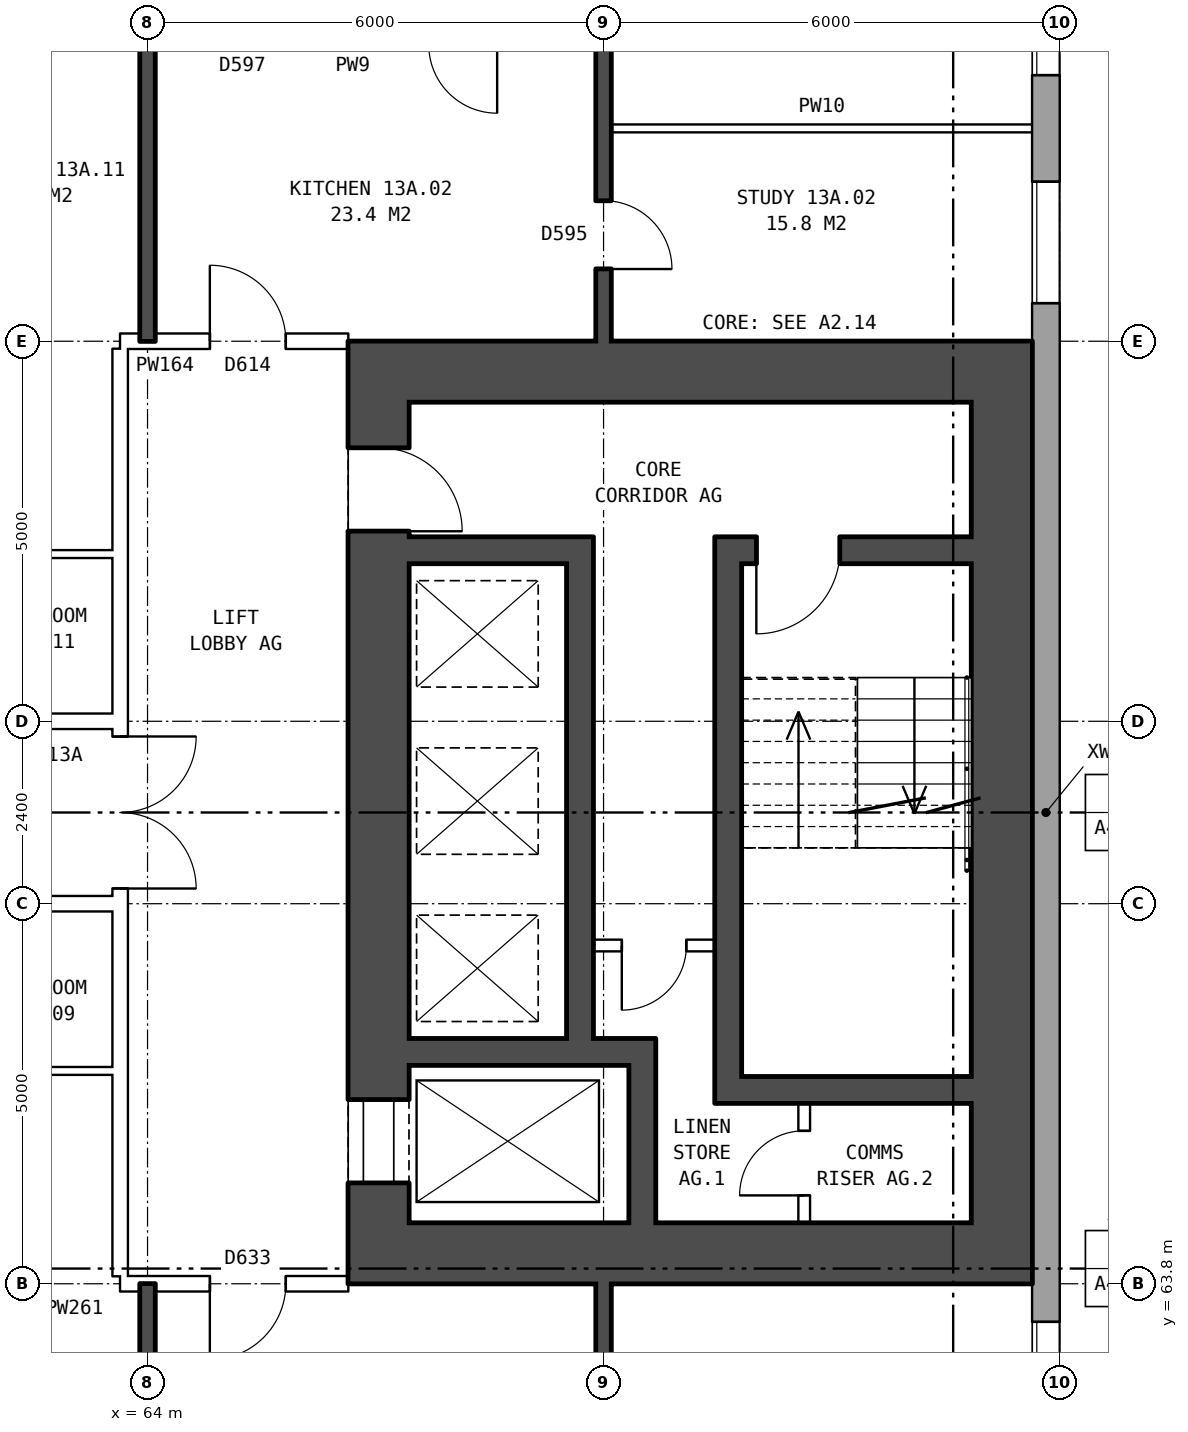
"""IFC4 building model, lengths in metres.
Left out: names, types, materials, properties, quantities, classifications, styles, units other than length and angle.
Written with IfcOpenShell. Run it as: python <this file> out.ifc"""

import sys

from ifc_helpers import new_model, si_unit, direction, frame, frame_2d, origin, place, context, subcontext, project, spatial, rectangle, extrude, element, fill, save


model = new_model("IFC4")
c1 = context("Model", 3, precision=1e-05, world=origin(), true_north=direction((0.0, 1.0)))
c2 = subcontext(c1, "Body", "Model", "MODEL_VIEW")
j1 = project(units=[si_unit("LENGTHUNIT", "METRE"), si_unit("PLANEANGLEUNIT", "RADIAN")], contexts=[c1])
p1 = place(None, origin())
s1 = spatial("IfcSite", under=j1, at=p1, CompositionType="ELEMENT")
p2 = place(p1, origin())
s2 = spatial("IfcBuilding", under=s1, at=p2, CompositionType="ELEMENT")
p3 = place(p2, frame((0.0, 0.0, 50.5)))
s3 = spatial("IfcBuildingStorey", under=s2, at=p3, CompositionType="ELEMENT", Elevation=50.5)
p4 = place(p3, frame((75.82, 57.075, 0.0), z_axis=(0.0, 0.0, 1.0), x_axis=(0.0, 1.0, 0.0)))
e1 = element("IfcWall", 1, at=p4, inside=s3, PredefinedType="STANDARD", context=c2, shape_type="SweptSolid", body=[
    extrude(rectangle(XDim=25.851, YDim=0.36, at=frame_2d((12.925, 0.0))), origin(), (0.0, 0.0, 1.0), 2.85),
])
p5 = place(p4, frame((1.625, 0.0, 0.8)))
e2 = element("IfcOpeningElement", 2, at=p5, cuts=e1, PredefinedType="OPENING", context=c2, shape_type="SweptSolid", body=[
    extrude(rectangle(XDim=1.6, YDim=1.8, at=frame_2d((0.8, 0.9))), frame((0.0, 0.19, 0.0), z_axis=(0.0, -1.0, 0.0), x_axis=(1.0, 0.0, 0.0)), (0.0, 0.0, 1.0), 0.38),
])
p6 = place(p4, frame((4.625, 0.0, 0.8)))
e3 = element("IfcOpeningElement", 3, at=p6, cuts=e1, PredefinedType="OPENING", context=c2, shape_type="SweptSolid", body=[
    extrude(rectangle(XDim=1.6, YDim=1.8, at=frame_2d((0.8, 0.9))), frame((0.0, 0.19, 0.0), z_axis=(0.0, -1.0, 0.0), x_axis=(1.0, 0.0, 0.0)), (0.0, 0.0, 1.0), 0.38),
])
p7 = place(p4, frame((19.625, 0.0, 0.8)))
e4 = element("IfcOpeningElement", 4, at=p7, cuts=e1, PredefinedType="OPENING", context=c2, shape_type="SweptSolid", body=[
    extrude(rectangle(XDim=1.6, YDim=1.8, at=frame_2d((0.8, 0.9))), frame((0.0, 0.19, 0.0), z_axis=(0.0, -1.0, 0.0), x_axis=(1.0, 0.0, 0.0)), (0.0, 0.0, 1.0), 0.38),
])
p8 = place(p4, frame((22.625, 0.0, 0.8)))
e5 = element("IfcOpeningElement", 5, at=p8, cuts=e1, PredefinedType="OPENING", context=c2, shape_type="SweptSolid", body=[
    extrude(rectangle(XDim=1.6, YDim=1.8, at=frame_2d((0.8, 0.9))), frame((0.0, 0.19, 0.0), z_axis=(0.0, -1.0, 0.0), x_axis=(1.0, 0.0, 0.0)), (0.0, 0.0, 1.0), 0.38),
])
p9 = place(p3, frame((67.04, 64.6, 0.0), z_axis=(0.0, 0.0, 1.0), x_axis=(0.0, 1.0, 0.0)))
e6 = element("IfcWall", 6, at=p9, inside=s3, PredefinedType="SHEAR", context=c2, shape_type="SweptSolid", body=[
    extrude(rectangle(XDim=10.8, YDim=0.8, at=frame_2d((5.4, 0.0))), origin(), (0.0, 0.0, 1.0), 2.85),
])
p10 = place(p9, frame((0.525, 0.0, 0.0)))
e7 = element("IfcOpeningElement", 7, at=p10, cuts=e6, PredefinedType="OPENING", context=c2, shape_type="SweptSolid", body=[
    extrude(rectangle(XDim=1.1, YDim=2.1, at=frame_2d((0.55, 1.05))), frame((0.0, 0.41, 0.0), z_axis=(0.0, -1.0, 0.0), x_axis=(1.0, 0.0, 0.0)), (0.0, 0.0, 1.0), 0.82),
])
p11 = place(p9, frame((9.1, 0.0, 0.0)))
e8 = element("IfcOpeningElement", 8, at=p11, cuts=e6, PredefinedType="OPENING", context=c2, shape_type="SweptSolid", body=[
    extrude(rectangle(XDim=1.1, YDim=2.1, at=frame_2d((0.55, 1.05))), frame((0.0, 0.41, 0.0), z_axis=(0.0, -1.0, 0.0), x_axis=(1.0, 0.0, 0.0)), (0.0, 0.0, 1.0), 0.82),
])
p12 = place(p3, frame((75.24, 64.6, 0.0), z_axis=(0.0, 0.0, 1.0), x_axis=(0.0, 1.0, 0.0)))
e9 = element("IfcWall", 9, at=p12, inside=s3, PredefinedType="SHEAR", context=c2, shape_type="SweptSolid", body=[
    extrude(rectangle(XDim=10.8, YDim=0.8, at=frame_2d((5.4, 0.0))), origin(), (0.0, 0.0, 1.0), 2.85),
])
for number, where, z_axis, x_axis in (
    (10, (66.64, 64.2, 0.0), (0.0, 0.0, 1.0), (1.0, 0.0, 0.0)),
    (11, (66.64, 75.8, 0.0), (0.0, 0.0, 1.0), (1.0, 0.0, 0.0)),
):
    element("IfcWall", number, at=place(p3, frame(where, z_axis=z_axis, x_axis=x_axis)), inside=s3, PredefinedType="SHEAR", context=c2, shape_type="SweptSolid", body=[
        extrude(rectangle(XDim=9.0, YDim=0.8, at=frame_2d((4.5, 0.0))), origin(), (0.0, 0.0, 1.0), 2.85),
    ])
p13 = place(p3, frame((71.815, 66.35, 0.0), z_axis=(0.0, 0.0, 1.0), x_axis=(1.0, 0.0, 0.0)))
e12 = element("IfcWall", 12, at=p13, inside=s3, PredefinedType="SHEAR", context=c2, shape_type="SweptSolid", body=[
    extrude(rectangle(XDim=3.025, YDim=0.35, at=frame_2d((1.513, 0.0))), origin(), (0.0, 0.0, 1.0), 2.85),
])
p14 = place(p3, frame((67.44, 66.85, 0.0), z_axis=(0.0, 0.0, 1.0), x_axis=(1.0, 0.0, 0.0)))
e13 = element("IfcWall", 13, at=p14, inside=s3, PredefinedType="SHEAR", context=c2, shape_type="SweptSolid", body=[
    extrude(rectangle(XDim=3.245, YDim=0.35, at=frame_2d((1.623, 0.0))), origin(), (0.0, 0.0, 1.0), 2.85),
])
p15 = place(p3, frame((69.865, 68.25, 0.0), z_axis=(0.0, 0.0, 1.0), x_axis=(1.0, 0.0, 0.0)))
e14 = element("IfcWall", 14, at=p15, inside=s3, PredefinedType="PARTITIONING", context=c2, shape_type="SweptSolid", body=[
    extrude(rectangle(XDim=1.6, YDim=0.15, at=frame_2d((0.8, 0.0))), origin(), (0.0, 0.0, 1.0), 2.85),
])
p16 = place(p15, frame((0.375, 0.0, 0.0)))
e15 = element("IfcOpeningElement", 15, at=p16, cuts=e14, PredefinedType="OPENING", context=c2, shape_type="SweptSolid", body=[
    extrude(rectangle(XDim=0.85, YDim=2.1, at=frame_2d((0.425, 1.05))), frame((0.0, 0.085, 0.0), z_axis=(0.0, -1.0, 0.0), x_axis=(1.0, 0.0, 0.0)), (0.0, 0.0, 1.0), 0.17),
])
p17 = place(p3, frame((67.44, 73.45, 0.0), z_axis=(0.0, 0.0, 1.0), x_axis=(1.0, 0.0, 0.0)))
e16 = element("IfcWall", 16, at=p17, inside=s3, PredefinedType="SHEAR", context=c2, shape_type="SweptSolid", body=[
    extrude(rectangle(XDim=2.075, YDim=0.35, at=frame_2d((1.038, 0.0))), origin(), (0.0, 0.0, 1.0), 2.85),
])
p18 = place(p3, frame((71.815, 73.45, 0.0), z_axis=(0.0, 0.0, 1.0), x_axis=(1.0, 0.0, 0.0)))
e17 = element("IfcWall", 17, at=p18, inside=s3, PredefinedType="SHEAR", context=c2, shape_type="SweptSolid", body=[
    extrude(rectangle(XDim=3.025, YDim=0.35, at=frame_2d((1.513, 0.0))), origin(), (0.0, 0.0, 1.0), 2.85),
])
p19 = place(p18, frame((0.195, 0.0, 0.0)))
e18 = element("IfcOpeningElement", 18, at=p19, cuts=e17, PredefinedType="OPENING", context=c2, shape_type="SweptSolid", body=[
    extrude(rectangle(XDim=1.1, YDim=2.1, at=frame_2d((0.55, 1.05))), frame((0.0, 0.185, 0.0), z_axis=(0.0, -1.0, 0.0), x_axis=(1.0, 0.0, 0.0)), (0.0, 0.0, 1.0), 0.37),
])
p20 = place(p3, frame((69.69, 67.025, 0.0), z_axis=(0.0, 0.0, 1.0), x_axis=(0.0, 1.0, 0.0)))
e19 = element("IfcWall", 19, at=p20, inside=s3, PredefinedType="SHEAR", context=c2, shape_type="SweptSolid", body=[
    extrude(rectangle(XDim=6.6, YDim=0.35, at=frame_2d((3.3, 0.0))), origin(), (0.0, 0.0, 1.0), 2.85),
])
p21 = place(p3, frame((70.51, 64.6, 0.0), z_axis=(0.0, 0.0, 1.0), x_axis=(0.0, 1.0, 0.0)))
e20 = element("IfcWall", 20, at=p21, inside=s3, PredefinedType="SHEAR", context=c2, shape_type="SweptSolid", body=[
    extrude(rectangle(XDim=2.075, YDim=0.35, at=frame_2d((1.038, 0.0))), origin(), (0.0, 0.0, 1.0), 2.85),
])
p22 = place(p3, frame((71.64, 66.175, 0.0), z_axis=(0.0, 0.0, 1.0), x_axis=(0.0, 1.0, 0.0)))
e21 = element("IfcWall", 21, at=p22, inside=s3, PredefinedType="SHEAR", context=c2, shape_type="SweptSolid", body=[
    extrude(rectangle(XDim=7.45, YDim=0.35, at=frame_2d((3.725, 0.0))), origin(), (0.0, 0.0, 1.0), 2.85),
])
p23 = place(p3, frame((72.64, 64.6, 0.0), z_axis=(0.0, 0.0, 1.0), x_axis=(0.0, 1.0, 0.0)))
e22 = element("IfcWall", 22, at=p23, inside=s3, PredefinedType="PARTITIONING", context=c2, shape_type="SweptSolid", body=[
    extrude(rectangle(XDim=1.575, YDim=0.15, at=frame_2d((0.788, 0.0))), origin(), (0.0, 0.0, 1.0), 2.85),
])
p24 = place(p23, frame((0.363, 0.0, 0.0)))
e23 = element("IfcOpeningElement", 23, at=p24, cuts=e22, PredefinedType="OPENING", context=c2, shape_type="SweptSolid", body=[
    extrude(rectangle(XDim=0.85, YDim=2.1, at=frame_2d((0.425, 1.05))), frame((0.0, 0.085, 0.0), z_axis=(0.0, -1.0, 0.0), x_axis=(1.0, 0.0, 0.0)), (0.0, 0.0, 1.0), 0.17),
])
p25 = place(p3, frame((63.64, 63.9, 0.0), z_axis=(0.0, 0.0, 1.0), x_axis=(0.0, 1.0, 0.0)))
e24 = element("IfcWall", 24, at=p25, inside=s3, PredefinedType="PARTITIONING", context=c2, shape_type="SweptSolid", body=[
    extrude(rectangle(XDim=12.2, YDim=0.2, at=frame_2d((6.1, 0.0))), origin(), (0.0, 0.0, 1.0), 2.85),
])
p26 = place(p25, frame((5.1, 0.0, 0.0)))
e25 = element("IfcOpeningElement", 25, at=p26, cuts=e24, PredefinedType="OPENING", context=c2, shape_type="SweptSolid", body=[
    extrude(rectangle(XDim=2.0, YDim=2.1, at=frame_2d((1.0, 1.05))), frame((0.0, 0.11, 0.0), z_axis=(0.0, -1.0, 0.0), x_axis=(1.0, 0.0, 0.0)), (0.0, 0.0, 1.0), 0.22),
])
p27 = place(p3, frame((63.64, 63.8, 0.0), z_axis=(0.0, 0.0, 1.0), x_axis=(1.0, 0.0, 0.0)))
e26 = element("IfcWall", 26, at=p27, inside=s3, PredefinedType="PARTITIONING", context=c2, shape_type="SweptSolid", body=[
    extrude(rectangle(XDim=3.0, YDim=0.2, at=frame_2d((1.5, 0.0))), origin(), (0.0, 0.0, 1.0), 2.85),
])
p28 = place(p27, frame((1.18, 0.0, 0.0)))
e27 = element("IfcOpeningElement", 27, at=p28, cuts=e26, PredefinedType="OPENING", context=c2, shape_type="SweptSolid", body=[
    extrude(rectangle(XDim=1.0, YDim=2.1, at=frame_2d((0.5, 1.05))), frame((0.0, 0.11, 0.0), z_axis=(0.0, -1.0, 0.0), x_axis=(1.0, 0.0, 0.0)), (0.0, 0.0, 1.0), 0.22),
])
p29 = place(p3, frame((61.0, 66.6, 0.0), z_axis=(0.0, 0.0, 1.0), x_axis=(1.0, 0.0, 0.0)))
e28 = element("IfcWall", 28, at=p29, inside=s3, PredefinedType="PARTITIONING", context=c2, shape_type="SweptSolid", body=[
    extrude(rectangle(XDim=2.64, YDim=0.1, at=frame_2d((1.32, 0.0))), origin(), (0.0, 0.0, 1.0), 2.85),
])
p30 = place(p3, frame((44.36, 68.8, 0.0), z_axis=(0.0, 0.0, 1.0), x_axis=(1.0, 0.0, 0.0)))
e29 = element("IfcWall", 29, at=p30, inside=s3, PredefinedType="PARTITIONING", context=c2, shape_type="SweptSolid", body=[
    extrude(rectangle(XDim=19.28, YDim=0.2, at=frame_2d((9.64, 0.0))), origin(), (0.0, 0.0, 1.0), 2.85),
])
p31 = place(p30, frame((14.64, 0.0, 0.0)))
e30 = element("IfcOpeningElement", 30, at=p31, cuts=e29, PredefinedType="OPENING", context=c2, shape_type="SweptSolid", body=[
    extrude(rectangle(XDim=1.0, YDim=2.1, at=frame_2d((0.5, 1.05))), frame((0.0, 0.11, 0.0), z_axis=(0.0, -1.0, 0.0), x_axis=(1.0, 0.0, 0.0)), (0.0, 0.0, 1.0), 0.22),
])
p32 = place(p30, frame((5.64, 0.0, 0.0)))
e31 = element("IfcOpeningElement", 31, at=p32, cuts=e29, PredefinedType="OPENING", context=c2, shape_type="SweptSolid", body=[
    extrude(rectangle(XDim=1.0, YDim=2.1, at=frame_2d((0.5, 1.05))), frame((0.0, 0.11, 0.0), z_axis=(0.0, -1.0, 0.0), x_axis=(1.0, 0.0, 0.0)), (0.0, 0.0, 1.0), 0.22),
])
p33 = place(p3, frame((44.36, 71.2, 0.0), z_axis=(0.0, 0.0, 1.0), x_axis=(1.0, 0.0, 0.0)))
e32 = element("IfcWall", 32, at=p33, inside=s3, PredefinedType="PARTITIONING", context=c2, shape_type="SweptSolid", body=[
    extrude(rectangle(XDim=19.28, YDim=0.2, at=frame_2d((9.64, 0.0))), origin(), (0.0, 0.0, 1.0), 2.85),
])
p34 = place(p33, frame((14.64, 0.0, 0.0)))
e33 = element("IfcOpeningElement", 33, at=p34, cuts=e32, PredefinedType="OPENING", context=c2, shape_type="SweptSolid", body=[
    extrude(rectangle(XDim=1.0, YDim=2.1, at=frame_2d((0.5, 1.05))), frame((0.0, 0.11, 0.0), z_axis=(0.0, -1.0, 0.0), x_axis=(1.0, 0.0, 0.0)), (0.0, 0.0, 1.0), 0.22),
])
p35 = place(p33, frame((5.64, 0.0, 0.0)))
e34 = element("IfcOpeningElement", 34, at=p35, cuts=e32, PredefinedType="OPENING", context=c2, shape_type="SweptSolid", body=[
    extrude(rectangle(XDim=1.0, YDim=2.1, at=frame_2d((0.5, 1.05))), frame((0.0, 0.11, 0.0), z_axis=(0.0, -1.0, 0.0), x_axis=(1.0, 0.0, 0.0)), (0.0, 0.0, 1.0), 0.22),
])
p36 = place(p3, frame((61.0, 73.4, 0.0), z_axis=(0.0, 0.0, 1.0), x_axis=(1.0, 0.0, 0.0)))
e35 = element("IfcWall", 35, at=p36, inside=s3, PredefinedType="PARTITIONING", context=c2, shape_type="SweptSolid", body=[
    extrude(rectangle(XDim=2.64, YDim=0.1, at=frame_2d((1.32, 0.0))), origin(), (0.0, 0.0, 1.0), 2.85),
])
p37 = place(p3, frame((63.64, 76.2, 0.0), z_axis=(0.0, 0.0, 1.0), x_axis=(1.0, 0.0, 0.0)))
e36 = element("IfcWall", 36, at=p37, inside=s3, PredefinedType="PARTITIONING", context=c2, shape_type="SweptSolid", body=[
    extrude(rectangle(XDim=3.0, YDim=0.2, at=frame_2d((1.5, 0.0))), origin(), (0.0, 0.0, 1.0), 2.85),
])
p38 = place(p37, frame((1.18, 0.0, 0.0)))
e37 = element("IfcOpeningElement", 37, at=p38, cuts=e36, PredefinedType="OPENING", context=c2, shape_type="SweptSolid", body=[
    extrude(rectangle(XDim=1.0, YDim=2.1, at=frame_2d((0.5, 1.05))), frame((0.0, 0.11, 0.0), z_axis=(0.0, -1.0, 0.0), x_axis=(1.0, 0.0, 0.0)), (0.0, 0.0, 1.0), 0.22),
])
p39 = place(p3, frame((70.1, 79.0, 0.0), z_axis=(0.0, 0.0, 1.0), x_axis=(1.0, 0.0, 0.0)))
e38 = element("IfcWall", 38, at=p39, inside=s3, PredefinedType="PARTITIONING", context=c2, shape_type="SweptSolid", body=[
    extrude(rectangle(XDim=5.54, YDim=0.1, at=frame_2d((2.77, 0.0))), origin(), (0.0, 0.0, 1.0), 2.85),
])
for number, where, z_axis, x_axis in (
    (39, (64.0, 54.36, 0.0), (0.0, 0.0, 1.0), (0.0, 1.0, 0.0)),
    (40, (64.0, 76.2, 0.0), (0.0, 0.0, 1.0), (0.0, 1.0, 0.0)),
):
    element("IfcWall", number, at=place(p3, frame(where, z_axis=z_axis, x_axis=x_axis)), inside=s3, PredefinedType="SOLIDWALL", context=c2, shape_type="SweptSolid", body=[
        extrude(rectangle(XDim=9.44, YDim=0.2, at=frame_2d((4.72, 0.0))), origin(), (0.0, 0.0, 1.0), 2.85),
    ])
p40 = place(p3, frame((70.0, 54.36, 0.0), z_axis=(0.0, 0.0, 1.0), x_axis=(0.0, 1.0, 0.0)))
e41 = element("IfcWall", 41, at=p40, inside=s3, PredefinedType="SOLIDWALL", context=c2, shape_type="SweptSolid", body=[
    extrude(rectangle(XDim=9.44, YDim=0.2, at=frame_2d((4.72, 0.0))), origin(), (0.0, 0.0, 1.0), 2.85),
])
p41 = place(p40, frame((7.04, 0.0, 0.0)))
e42 = element("IfcOpeningElement", 42, at=p41, cuts=e41, PredefinedType="OPENING", context=c2, shape_type="SweptSolid", body=[
    extrude(rectangle(XDim=0.9, YDim=2.1, at=frame_2d((0.45, 1.05))), frame((0.0, 0.11, 0.0), z_axis=(0.0, -1.0, 0.0), x_axis=(1.0, 0.0, 0.0)), (0.0, 0.0, 1.0), 0.22),
])
p42 = place(p3, frame((70.0, 76.2, 0.0), z_axis=(0.0, 0.0, 1.0), x_axis=(0.0, 1.0, 0.0)))
e43 = element("IfcWall", 43, at=p42, inside=s3, PredefinedType="SOLIDWALL", context=c2, shape_type="SweptSolid", body=[
    extrude(rectangle(XDim=9.44, YDim=0.2, at=frame_2d((4.72, 0.0))), origin(), (0.0, 0.0, 1.0), 2.85),
])
p43 = place(p42, frame((6.22, 0.0, 0.0)))
e44 = element("IfcOpeningElement", 44, at=p43, cuts=e43, PredefinedType="OPENING", context=c2, shape_type="SweptSolid", body=[
    extrude(rectangle(XDim=0.9, YDim=2.1, at=frame_2d((0.45, 1.05))), frame((0.0, 0.11, 0.0), z_axis=(0.0, -1.0, 0.0), x_axis=(1.0, 0.0, 0.0)), (0.0, 0.0, 1.0), 0.22),
])
p44 = place(p42, frame((0.95, 0.0, 0.0)))
e45 = element("IfcOpeningElement", 45, at=p44, cuts=e43, PredefinedType="OPENING", context=c2, shape_type="SweptSolid", body=[
    extrude(rectangle(XDim=0.9, YDim=2.1, at=frame_2d((0.45, 1.05))), frame((0.0, 0.11, 0.0), z_axis=(0.0, -1.0, 0.0), x_axis=(1.0, 0.0, 0.0)), (0.0, 0.0, 1.0), 0.22),
])
p45 = place(p6, origin())
e46 = element("IfcWindow", 46, at=p45, inside=s3, PartitioningType="SINGLE_PANEL", PredefinedType="WINDOW", context=c2, shape_type="SweptSolid", body=[
    extrude(rectangle(XDim=1.6, YDim=1.8, at=frame_2d((0.8, 0.9))), frame((0.0, 0.15, 0.0), z_axis=(0.0, -1.0, 0.0), x_axis=(1.0, 0.0, 0.0)), (0.0, 0.0, 1.0), 0.06),
])
fill(e3, e46)
p46 = place(p7, origin())
e47 = element("IfcWindow", 47, at=p46, inside=s3, PartitioningType="SINGLE_PANEL", PredefinedType="WINDOW", context=c2, shape_type="SweptSolid", body=[
    extrude(rectangle(XDim=1.6, YDim=1.8, at=frame_2d((0.8, 0.9))), frame((0.0, 0.15, 0.0), z_axis=(0.0, -1.0, 0.0), x_axis=(1.0, 0.0, 0.0)), (0.0, 0.0, 1.0), 0.06),
])
fill(e4, e47)
p47 = place(p8, origin())
e48 = element("IfcWindow", 48, at=p47, inside=s3, PartitioningType="SINGLE_PANEL", PredefinedType="WINDOW", context=c2, shape_type="SweptSolid", body=[
    extrude(rectangle(XDim=1.6, YDim=1.8, at=frame_2d((0.8, 0.9))), frame((0.0, 0.15, 0.0), z_axis=(0.0, -1.0, 0.0), x_axis=(1.0, 0.0, 0.0)), (0.0, 0.0, 1.0), 0.06),
])
fill(e5, e48)
p48 = place(p10, origin())
e49 = element("IfcDoor", 49, at=p48, inside=s3, OperationType="DOUBLE_DOOR_SLIDING", PredefinedType="DOOR", context=c2, shape_type="SweptSolid", body=[
    extrude(rectangle(XDim=1.1, YDim=2.1, at=frame_2d((0.55, 1.05))), frame((0.0, -0.335, 0.0), z_axis=(0.0, -1.0, 0.0), x_axis=(1.0, 0.0, 0.0)), (0.0, 0.0, 1.0), 0.05),
])
fill(e7, e49)
p49 = place(p11, frame((1.1, 0.0, 0.0), z_axis=(0.0, 0.0, 1.0), x_axis=(-1.0, 0.0, 0.0)))
e50 = element("IfcDoor", 50, at=p49, inside=s3, OperationType="SINGLE_SWING_RIGHT", PredefinedType="DOOR", context=c2, shape_type="SweptSolid", body=[
    extrude(rectangle(XDim=1.1, YDim=2.1, at=frame_2d((0.55, 1.05))), frame((0.0, 0.385, 0.0), z_axis=(0.0, -1.0, 0.0), x_axis=(1.0, 0.0, 0.0)), (0.0, 0.0, 1.0), 0.05),
])
fill(e8, e50)
p50 = place(p19, frame((1.1, 0.0, 0.0), z_axis=(0.0, 0.0, 1.0), x_axis=(-1.0, 0.0, 0.0)))
e51 = element("IfcDoor", 51, at=p50, inside=s3, OperationType="SINGLE_SWING_RIGHT", PredefinedType="DOOR", context=c2, shape_type="SweptSolid", body=[
    extrude(rectangle(XDim=1.1, YDim=2.1, at=frame_2d((0.55, 1.05))), frame((0.0, 0.025, 0.0), z_axis=(0.0, -1.0, 0.0), x_axis=(1.0, 0.0, 0.0)), (0.0, 0.0, 1.0), 0.05),
])
fill(e18, e51)
p51 = place(p16, frame((0.85, 0.0, 0.0), z_axis=(0.0, 0.0, 1.0), x_axis=(-1.0, 0.0, 0.0)))
e52 = element("IfcDoor", 52, at=p51, inside=s3, OperationType="SINGLE_SWING_RIGHT", PredefinedType="DOOR", context=c2, shape_type="SweptSolid", body=[
    extrude(rectangle(XDim=0.85, YDim=2.1, at=frame_2d((0.425, 1.05))), frame((0.0, 0.025, 0.0), z_axis=(0.0, -1.0, 0.0), x_axis=(1.0, 0.0, 0.0)), (0.0, 0.0, 1.0), 0.05),
])
fill(e15, e52)
p52 = place(p24, origin())
e53 = element("IfcDoor", 53, at=p52, inside=s3, OperationType="SINGLE_SWING_LEFT", PredefinedType="DOOR", context=c2, shape_type="SweptSolid", body=[
    extrude(rectangle(XDim=0.85, YDim=2.1, at=frame_2d((0.425, 1.05))), frame((0.0, 0.025, 0.0), z_axis=(0.0, -1.0, 0.0), x_axis=(1.0, 0.0, 0.0)), (0.0, 0.0, 1.0), 0.05),
])
fill(e23, e53)
p53 = place(p26, frame((2.0, 0.0, 0.0), z_axis=(0.0, 0.0, 1.0), x_axis=(-1.0, 0.0, 0.0)))
e54 = element("IfcDoor", 54, at=p53, inside=s3, OperationType="DOUBLE_DOOR_SINGLE_SWING", PredefinedType="DOOR", context=c2, shape_type="SweptSolid", body=[
    extrude(rectangle(XDim=2.0, YDim=2.1, at=frame_2d((1.0, 1.05))), frame((0.0, 0.025, 0.0), z_axis=(0.0, -1.0, 0.0), x_axis=(1.0, 0.0, 0.0)), (0.0, 0.0, 1.0), 0.05),
])
fill(e25, e54)
p54 = place(p28, frame((1.0, 0.0, 0.0), z_axis=(0.0, 0.0, 1.0), x_axis=(-1.0, 0.0, 0.0)))
e55 = element("IfcDoor", 55, at=p54, inside=s3, OperationType="SINGLE_SWING_RIGHT", PredefinedType="DOOR", context=c2, shape_type="SweptSolid", body=[
    extrude(rectangle(XDim=1.0, YDim=2.1, at=frame_2d((0.5, 1.05))), frame((0.0, 0.025, 0.0), z_axis=(0.0, -1.0, 0.0), x_axis=(1.0, 0.0, 0.0)), (0.0, 0.0, 1.0), 0.05),
])
fill(e27, e55)
p55 = place(p44, frame((0.9, 0.0, 0.0), z_axis=(0.0, 0.0, 1.0), x_axis=(-1.0, 0.0, 0.0)))
e56 = element("IfcDoor", 56, at=p55, inside=s3, OperationType="SINGLE_SWING_RIGHT", PredefinedType="DOOR", context=c2, shape_type="SweptSolid", body=[
    extrude(rectangle(XDim=0.9, YDim=2.1, at=frame_2d((0.45, 1.05))), frame((0.0, 0.025, 0.0), z_axis=(0.0, -1.0, 0.0), x_axis=(1.0, 0.0, 0.0)), (0.0, 0.0, 1.0), 0.05),
])
fill(e45, e56)
p56 = place(p38, origin())
e57 = element("IfcDoor", 57, at=p56, inside=s3, OperationType="SINGLE_SWING_LEFT", PredefinedType="DOOR", context=c2, shape_type="SweptSolid", body=[
    extrude(rectangle(XDim=1.0, YDim=2.1, at=frame_2d((0.5, 1.05))), frame((0.0, 0.025, 0.0), z_axis=(0.0, -1.0, 0.0), x_axis=(1.0, 0.0, 0.0)), (0.0, 0.0, 1.0), 0.05),
])
fill(e37, e57)
save(model, sys.argv[1])
